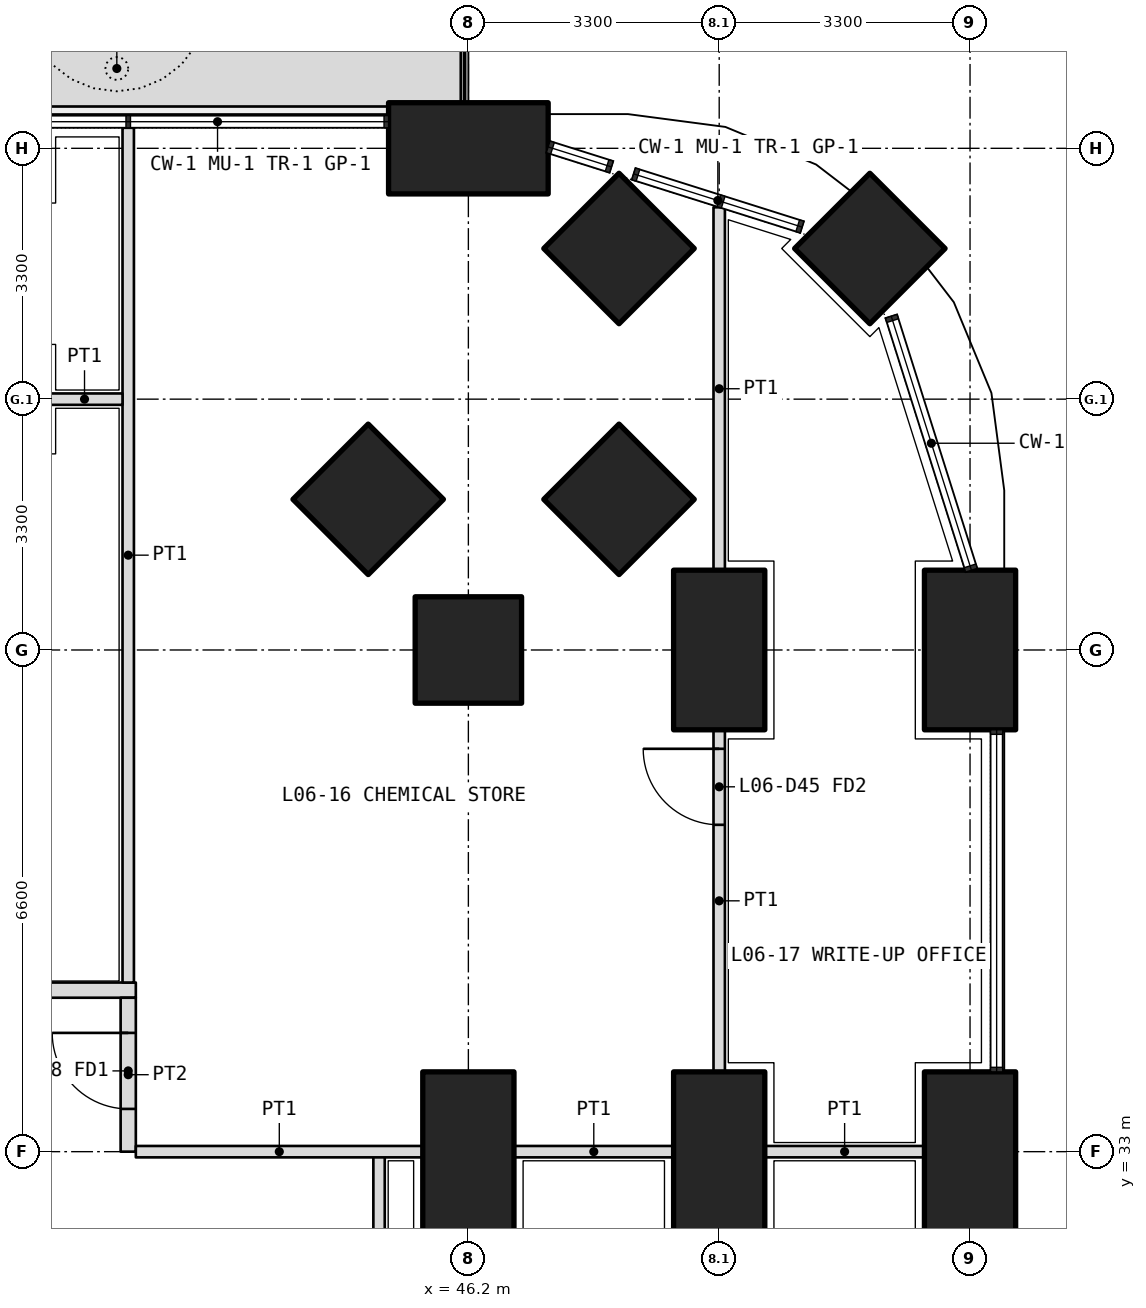
"""IFC4 building model, lengths in metres.
Left out: names, types, materials, properties, quantities, classifications, styles, units other than length and angle.
Written with IfcOpenShell. Run it as: python <this file> out.ifc"""

import sys

from ifc_helpers import new_model, si_unit, direction, frame, frame_2d, origin, origin_2d, place, context, subcontext, project, spatial, polyline, rectangle, outline, extrude, element, fill, save


model = new_model("IFC4")
c1 = context("Model", 3, precision=1e-05, world=origin(), true_north=direction((0.0, 1.0)))
c2 = subcontext(c1, "Body", "Model", "MODEL_VIEW")
j1 = project(units=[si_unit("LENGTHUNIT", "METRE"), si_unit("PLANEANGLEUNIT", "RADIAN")], contexts=[c1])
p1 = place(None, origin())
s1 = spatial("IfcSite", under=j1, at=p1, CompositionType="ELEMENT")
p2 = place(p1, origin())
s2 = spatial("IfcBuilding", under=s1, at=p2, CompositionType="ELEMENT")
p3 = place(p2, frame((0.0, 0.0, 29.7)))
s3 = spatial("IfcBuildingStorey", under=s2, at=p3, CompositionType="ELEMENT", Elevation=29.7)
p4 = place(p3, frame((51.482, 44.882, 0.0), z_axis=(0.0, 0.0, 1.0), x_axis=(0.707106781187, 0.707106781187, 0.0)))
e1 = element("IfcColumn", 1, at=p4, inside=s3, PredefinedType="COLUMN", context=c2, shape_type="SweptSolid", body=[
    extrude(rectangle(XDim=1.4, YDim=1.4, at=origin_2d()), origin(), (0.0, 0.0, 1.0), 4.2),
])
for number, where, z_axis, x_axis in (
    (2, (52.8, 33.0, 0.0), (0.0, 0.0, 1.0), (0.0, 1.0, 0.0)),
    (3, (52.8, 39.6, 0.0), (0.0, 0.0, 1.0), (0.0, 1.0, 0.0)),
    (4, (46.2, 46.2, 0.0), (0.0, 0.0, 1.0), (1.0, 0.0, 0.0)),
):
    element("IfcColumn", number, at=place(p3, frame(where, z_axis=z_axis, x_axis=x_axis)), inside=s3, PredefinedType="COLUMN", context=c2, shape_type="SweptSolid", body=[
        extrude(rectangle(XDim=2.1, YDim=1.2, at=origin_2d()), origin(), (0.0, 0.0, 1.0), 4.2),
    ])
for number, where, z_axis, x_axis in (
    (5, (46.2, 39.6, 0.0), (0.0, 0.0, 1.0), (1.0, 0.0, 0.0)),
    (6, (48.182, 44.882, 0.0), (0.0, 0.0, 1.0), (0.707, 0.707, 0.0)),
):
    element("IfcColumn", number, at=place(p3, frame(where, z_axis=z_axis, x_axis=x_axis)), inside=s3, PredefinedType="COLUMN", context=c2, shape_type="SweptSolid", body=[
        extrude(rectangle(XDim=1.4, YDim=1.4, at=origin_2d()), origin(), (0.0, 0.0, 1.0), 4.2),
    ])
for number, where, z_axis, x_axis in (
    (7, (49.5, 33.0, 0.0), (0.0, 0.0, 1.0), (0.0, 1.0, 0.0)),
    (8, (49.5, 39.6, 0.0), (0.0, 0.0, 1.0), (0.0, 1.0, 0.0)),
):
    element("IfcColumn", number, at=place(p3, frame(where, z_axis=z_axis, x_axis=x_axis)), inside=s3, PredefinedType="COLUMN", context=c2, shape_type="SweptSolid", body=[
        extrude(rectangle(XDim=2.1, YDim=1.2, at=origin_2d()), origin(), (0.0, 0.0, 1.0), 4.2),
    ])
for number, where, z_axis, x_axis in (
    (9, (48.182, 41.582, 0.0), (0.0, 0.0, 1.0), (0.707, 0.707, 0.0)),
    (10, (44.882, 41.582, 0.0), (0.0, 0.0, 1.0), (0.707, 0.707, 0.0)),
):
    element("IfcColumn", number, at=place(p3, frame(where, z_axis=z_axis, x_axis=x_axis)), inside=s3, PredefinedType="COLUMN", context=c2, shape_type="SweptSolid", body=[
        extrude(rectangle(XDim=1.4, YDim=1.4, at=origin_2d()), origin(), (0.0, 0.0, 1.0), 4.2),
    ])
p5 = place(p3, frame((46.2, 33.0, 0.0), z_axis=(0.0, 0.0, 1.0), x_axis=(0.0, 1.0, 0.0)))
e11 = element("IfcColumn", 11, at=p5, inside=s3, PredefinedType="COLUMN", context=c2, shape_type="SweptSolid", body=[
    extrude(rectangle(XDim=2.1, YDim=1.2, at=origin_2d()), origin(), (0.0, 0.0, 1.0), 4.2),
])
p6 = place(p3, origin())
e12 = element("IfcWall", 12, at=p6, inside=s3, PredefinedType="USERDEFINED", context=c2, shape_type="SweptSolid", body=[
    extrude(outline(polyline([(37.05, 46.75), (46.1, 46.75), (46.1, 47.75), (37.05, 47.75), (37.05, 46.75)]), holes=[polyline([(37.2, 46.9), (45.95, 46.9), (45.95, 47.6), (37.2, 47.6), (37.2, 46.9)])]), origin(), (0.0, 0.0, 1.0), 1.05),
])
p7 = place(p3, frame((10.975, 35.125, 0.0), z_axis=(0.0, 0.0, 1.0), x_axis=(1.0, 0.0, 0.0)))
e13 = element("IfcWall", 13, at=p7, inside=s3, PredefinedType="PARTITIONING", context=c2, shape_type="SweptSolid", body=[
    extrude(rectangle(XDim=30.85, YDim=0.2, at=frame_2d((15.425, 0.0))), origin(), (0.0, 0.0, 1.0), 2.85),
])
p8 = place(p7, frame((0.663, 0.0, 0.0)))
e14 = element("IfcOpeningElement", 14, at=p8, cuts=e13, PredefinedType="OPENING", context=c2, shape_type="SweptSolid", body=[
    extrude(rectangle(XDim=1.0, YDim=2.1, at=frame_2d((0.5, 1.05))), frame((0.0, 0.11, 0.0), z_axis=(0.0, -1.0, 0.0), x_axis=(1.0, 0.0, 0.0)), (0.0, 0.0, 1.0), 0.22),
])
p9 = place(p7, frame((4.925, 0.0, 0.0)))
e15 = element("IfcOpeningElement", 15, at=p9, cuts=e13, PredefinedType="OPENING", context=c2, shape_type="SweptSolid", body=[
    extrude(rectangle(XDim=1.2, YDim=2.1, at=frame_2d((0.6, 1.05))), frame((0.0, 0.11, 0.0), z_axis=(0.0, -1.0, 0.0), x_axis=(1.0, 0.0, 0.0)), (0.0, 0.0, 1.0), 0.22),
])
p10 = place(p7, frame((9.975, 0.0, 0.0)))
e16 = element("IfcOpeningElement", 16, at=p10, cuts=e13, PredefinedType="OPENING", context=c2, shape_type="SweptSolid", body=[
    extrude(rectangle(XDim=1.0, YDim=2.1, at=frame_2d((0.5, 1.05))), frame((0.0, 0.11, 0.0), z_axis=(0.0, -1.0, 0.0), x_axis=(1.0, 0.0, 0.0)), (0.0, 0.0, 1.0), 0.22),
])
p11 = place(p7, frame((13.725, 0.0, 0.0)))
e17 = element("IfcOpeningElement", 17, at=p11, cuts=e13, PredefinedType="OPENING", context=c2, shape_type="SweptSolid", body=[
    extrude(rectangle(XDim=1.0, YDim=2.1, at=frame_2d((0.5, 1.05))), frame((0.0, 0.11, 0.0), z_axis=(0.0, -1.0, 0.0), x_axis=(1.0, 0.0, 0.0)), (0.0, 0.0, 1.0), 0.22),
])
p12 = place(p7, frame((17.025, 0.0, 0.0)))
e18 = element("IfcOpeningElement", 18, at=p12, cuts=e13, PredefinedType="OPENING", context=c2, shape_type="SweptSolid", body=[
    extrude(rectangle(XDim=1.0, YDim=2.1, at=frame_2d((0.5, 1.05))), frame((0.0, 0.11, 0.0), z_axis=(0.0, -1.0, 0.0), x_axis=(1.0, 0.0, 0.0)), (0.0, 0.0, 1.0), 0.22),
])
p13 = place(p7, frame((24.137, 0.0, 0.0)))
e19 = element("IfcOpeningElement", 19, at=p13, cuts=e13, PredefinedType="OPENING", context=c2, shape_type="SweptSolid", body=[
    extrude(rectangle(XDim=1.2, YDim=2.1, at=frame_2d((0.6, 1.05))), frame((0.0, 0.11, 0.0), z_axis=(0.0, -1.0, 0.0), x_axis=(1.0, 0.0, 0.0)), (0.0, 0.0, 1.0), 0.22),
])
p14 = place(p3, frame((41.725, 33.0, 0.0), z_axis=(0.0, 0.0, 1.0), x_axis=(0.0, 1.0, 0.0)))
e20 = element("IfcWall", 20, at=p14, inside=s3, PredefinedType="PARTITIONING", context=c2, shape_type="SweptSolid", body=[
    extrude(rectangle(XDim=2.025, YDim=0.2, at=frame_2d((1.012, 0.0))), origin(), (0.0, 0.0, 1.0), 2.85),
])
p15 = place(p14, frame((0.562, 0.0, 0.0)))
e21 = element("IfcOpeningElement", 21, at=p15, cuts=e20, PredefinedType="OPENING", context=c2, shape_type="SweptSolid", body=[
    extrude(rectangle(XDim=1.0, YDim=2.1, at=frame_2d((0.5, 1.05))), frame((0.0, 0.11, 0.0), z_axis=(0.0, -1.0, 0.0), x_axis=(1.0, 0.0, 0.0)), (0.0, 0.0, 1.0), 0.22),
])
p16 = place(p3, frame((41.725, 46.47, 0.0), z_axis=(0.0, 0.0, 1.0), x_axis=(0.0, -1.0, 0.0)))
e22 = element("IfcWall", 22, at=p16, inside=s3, PredefinedType="PARTITIONING", context=c2, shape_type="SweptSolid", body=[
    extrude(rectangle(XDim=11.245, YDim=0.15, at=frame_2d((5.623, 0.0))), origin(), (0.0, 0.0, 1.0), 2.7),
])
p17 = place(p3, frame((49.5, 34.05, 0.0), z_axis=(0.0, 0.0, 1.0), x_axis=(0.0, 1.0, 0.0)))
e23 = element("IfcWall", 23, at=p17, inside=s3, PredefinedType="PARTITIONING", context=c2, shape_type="SweptSolid", body=[
    extrude(rectangle(XDim=4.5, YDim=0.15, at=frame_2d((2.25, 0.0))), origin(), (0.0, 0.0, 1.0), 3.9),
])
p18 = place(p17, frame((3.25, 0.0, 0.0)))
e24 = element("IfcOpeningElement", 24, at=p18, cuts=e23, PredefinedType="OPENING", context=c2, shape_type="SweptSolid", body=[
    extrude(rectangle(XDim=1.0, YDim=2.1, at=frame_2d((0.5, 1.05))), frame((0.0, 0.085, 0.0), z_axis=(0.0, -1.0, 0.0), x_axis=(1.0, 0.0, 0.0)), (0.0, 0.0, 1.0), 0.17),
])
p19 = place(p3, frame((49.5, 40.65, 0.0), z_axis=(0.0, 0.0, 1.0), x_axis=(0.0, 1.0, 0.0)))
e25 = element("IfcWall", 25, at=p19, inside=s3, PredefinedType="PARTITIONING", context=c2, shape_type="SweptSolid", body=[
    extrude(rectangle(XDim=4.774, YDim=0.15, at=frame_2d((2.387, 0.0))), origin(), (0.0, 0.0, 1.0), 2.7),
])
p20 = place(p3, frame((45.025, 29.7, 0.0), z_axis=(0.0, 0.0, 1.0), x_axis=(0.0, 1.0, 0.0)))
e26 = element("IfcWall", 26, at=p20, inside=s3, PredefinedType="PARTITIONING", context=c2, shape_type="SweptSolid", body=[
    extrude(rectangle(XDim=3.3, YDim=0.15, at=frame_2d((1.65, 0.0))), origin(), (0.0, 0.0, 1.0), 2.85),
])
p21 = place(p20, frame((0.9, 0.0, 0.0)))
e27 = element("IfcOpeningElement", 27, at=p21, cuts=e26, PredefinedType="OPENING", context=c2, shape_type="SweptSolid", body=[
    extrude(rectangle(XDim=1.2, YDim=2.1, at=frame_2d((0.6, 1.05))), frame((0.0, 0.085, 0.0), z_axis=(0.0, -1.0, 0.0), x_axis=(1.0, 0.0, 0.0)), (0.0, 0.0, 1.0), 0.17),
])
for number, where, z_axis, x_axis in (
    (28, (52.2, 33.0, 0.0), (0.0, 0.0, 1.0), (-1.0, 0.0, 0.0)),
    (29, (48.9, 33.0, 0.0), (0.0, 0.0, 1.0), (-1.0, 0.0, 0.0)),
):
    element("IfcWall", number, at=place(p3, frame(where, z_axis=z_axis, x_axis=x_axis)), inside=s3, PredefinedType="PARTITIONING", context=c2, shape_type="SweptSolid", body=[
        extrude(rectangle(XDim=2.1, YDim=0.15, at=frame_2d((1.05, 0.0))), origin(), (0.0, 0.0, 1.0), 2.85),
    ])
p22 = place(p3, frame((45.6, 33.0, 0.0), z_axis=(0.0, 0.0, 1.0), x_axis=(-1.0, 0.0, 0.0)))
e30 = element("IfcWall", 30, at=p22, inside=s3, PredefinedType="PARTITIONING", context=c2, shape_type="SweptSolid", body=[
    extrude(rectangle(XDim=3.775, YDim=0.15, at=frame_2d((1.888, 0.0))), origin(), (0.0, 0.0, 1.0), 2.85),
])
p23 = place(p3, frame((41.65, 42.9, 0.0), z_axis=(0.0, 0.0, 1.0), x_axis=(-1.0, 0.0, 0.0)))
e31 = element("IfcWall", 31, at=p23, inside=s3, PredefinedType="PARTITIONING", context=c2, shape_type="SweptSolid", body=[
    extrude(rectangle(XDim=1.0, YDim=0.15, at=frame_2d((0.5, 0.0))), origin(), (0.0, 0.0, 1.0), 3.9),
])
p24 = place(p15, origin())
e32 = element("IfcDoor", 32, at=p24, inside=s3, OperationType="SINGLE_SWING_RIGHT", PredefinedType="DOOR", context=c2, shape_type="SweptSolid", body=[
    extrude(rectangle(XDim=1.0, YDim=2.1, at=frame_2d((0.5, 1.05))), frame((0.0, 0.025, 0.0), z_axis=(0.0, -1.0, 0.0), x_axis=(1.0, 0.0, 0.0)), (0.0, 0.0, 1.0), 0.05),
])
fill(e21, e32)
p25 = place(p18, origin())
e33 = element("IfcDoor", 33, at=p25, inside=s3, OperationType="SINGLE_SWING_RIGHT", PredefinedType="DOOR", context=c2, shape_type="SweptSolid", body=[
    extrude(rectangle(XDim=1.0, YDim=2.1, at=frame_2d((0.5, 1.05))), frame((0.0, 0.025, 0.0), z_axis=(0.0, -1.0, 0.0), x_axis=(1.0, 0.0, 0.0)), (0.0, 0.0, 1.0), 0.05),
])
fill(e24, e33)
save(model, sys.argv[1])
